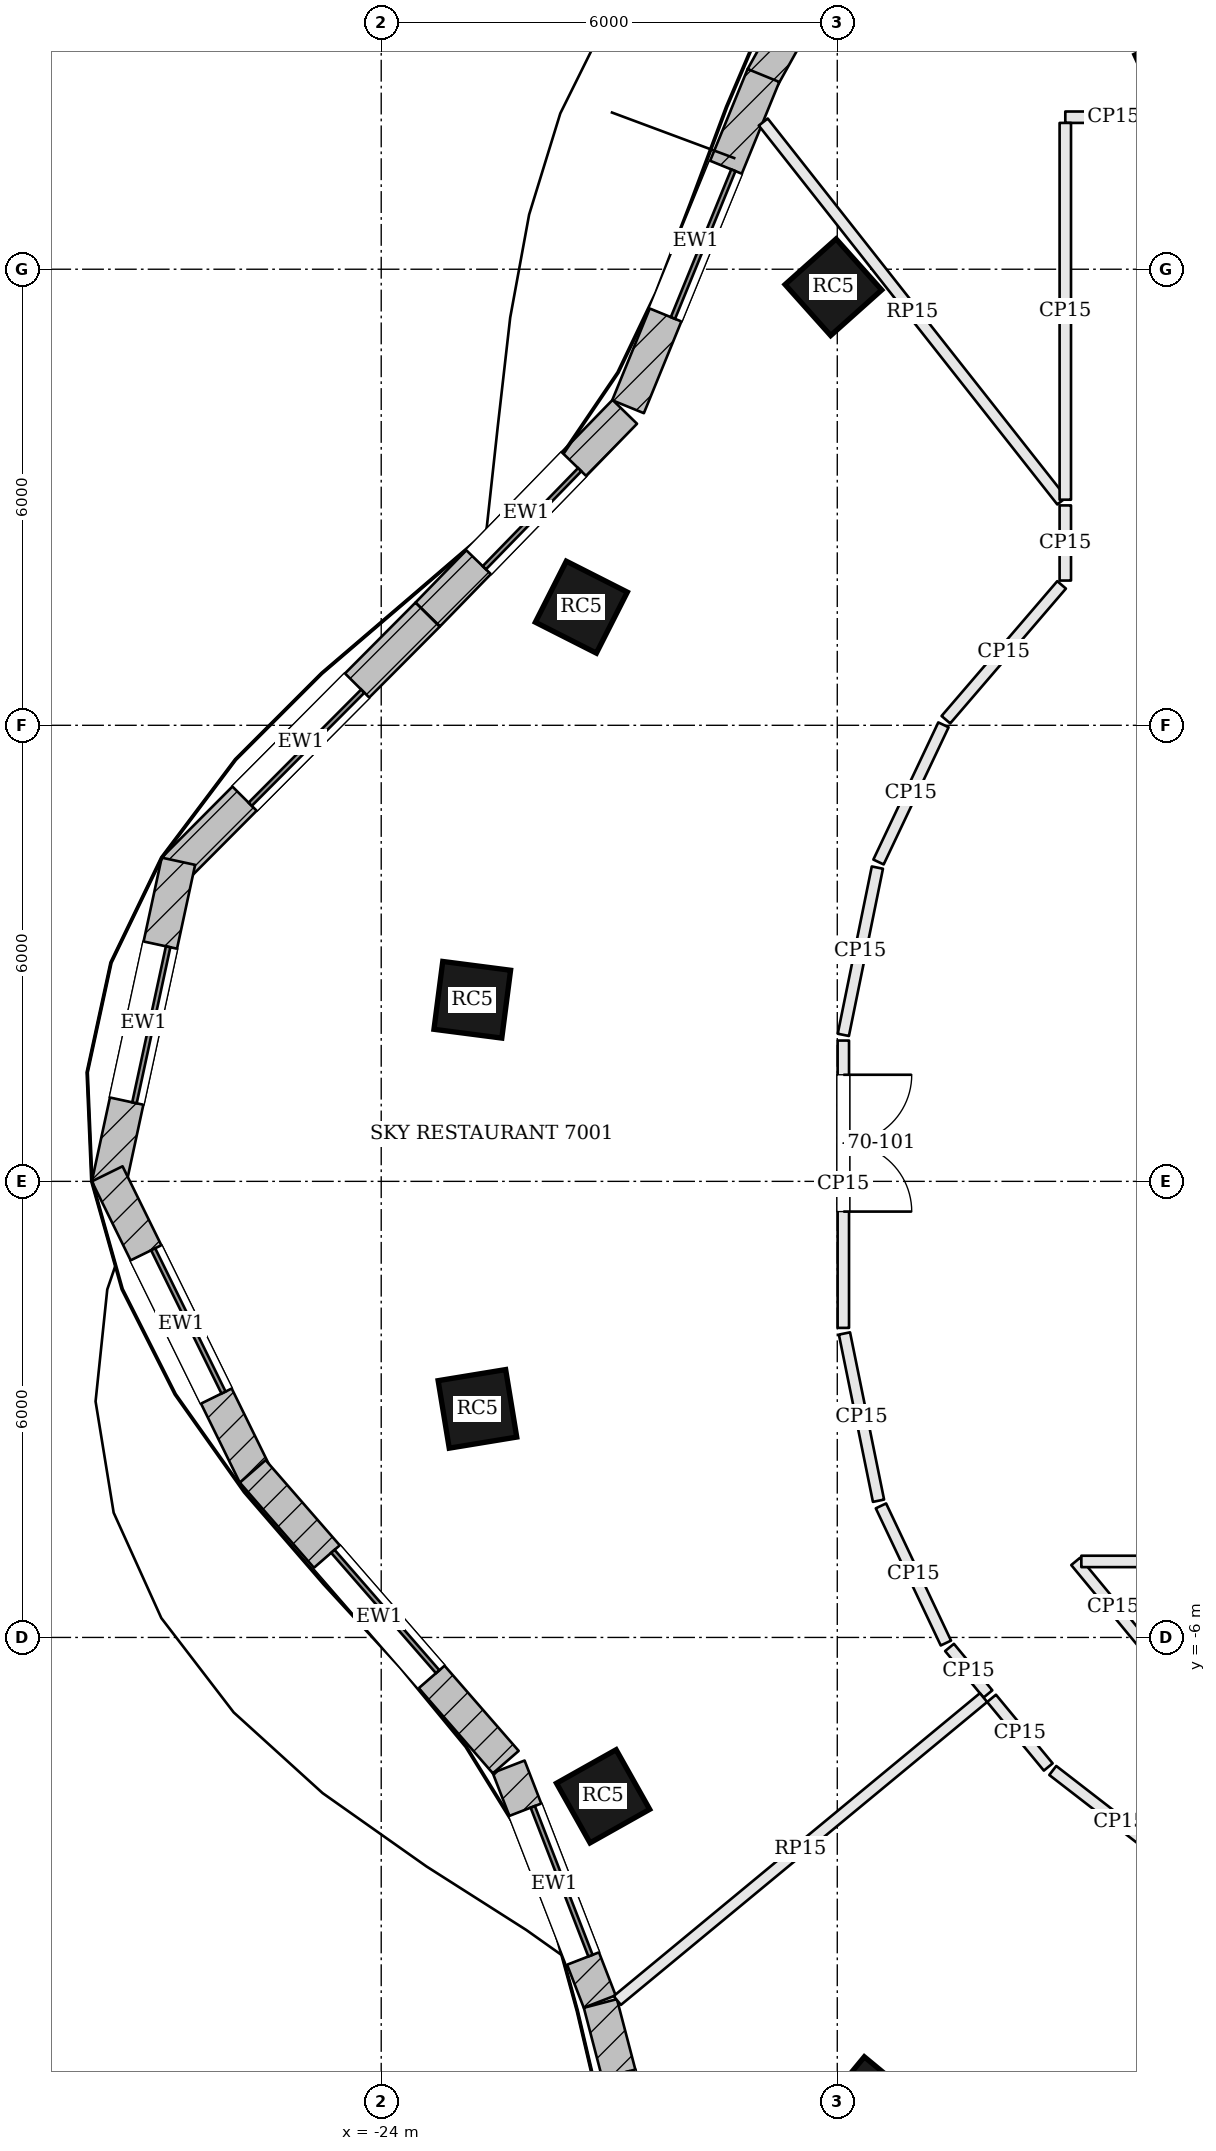
"""IFC4 building model, lengths in metres.
Left out: names, types, materials, properties, quantities, classifications, styles, units other than length and angle.
Written with IfcOpenShell. Run it as: python <this file> out.ifc"""

import sys

from ifc_helpers import new_model, si_unit, direction, frame, frame_2d, origin, origin_2d, place, context, subcontext, project, spatial, rectangle, extrude, element, fill, save


model = new_model("IFC4")
c1 = context("Model", 3, precision=1e-05, world=origin(), true_north=direction((0.0, 1.0)))
c2 = subcontext(c1, "Body", "Model", "MODEL_VIEW")
j1 = project(units=[si_unit("LENGTHUNIT", "METRE"), si_unit("PLANEANGLEUNIT", "RADIAN")], contexts=[c1])
p1 = place(None, origin())
s1 = spatial("IfcSite", under=j1, at=p1, CompositionType="ELEMENT")
p2 = place(p1, origin())
s2 = spatial("IfcBuilding", under=s1, at=p2, CompositionType="ELEMENT")
p3 = place(p2, frame((0.0, 0.0, 284.4)))
s3 = spatial("IfcBuildingStorey", under=s2, at=p3, CompositionType="ELEMENT", Elevation=284.4)
for number, where, z_axis, x_axis in (
    (1, (-13.487, 14.596, 0.0), (0.0, 0.0, 1.0), (-0.91, -0.415, 0.0)),
    (2, (-18.051, 11.763, 0.0), (0.0, 0.0, 1.0), (-0.746, -0.666, 0.0)),
    (3, (-21.367, 7.554, 0.0), (0.0, 0.0, 1.0), (-0.452, -0.892, 0.0)),
    (4, (-22.802, 2.389, 0.0), (0.0, 0.0, 1.0), (-0.129, -0.992, 0.0)),
    (5, (-22.734, -2.993, 0.0), (0.0, 0.0, 1.0), (0.162, -0.987, 0.0)),
    (6, (-21.081, -8.09, 0.0), (0.0, 0.0, 1.0), (0.49, -0.872, 0.0)),
    (7, (-17.584, -12.151, 0.0), (0.0, 0.0, 1.0), (0.771, -0.637, 0.0)),
):
    element("IfcColumn", number, at=place(p3, frame(where, z_axis=z_axis, x_axis=x_axis)), inside=s3, PredefinedType="COLUMN", context=c2, shape_type="SweptSolid", body=[
        extrude(rectangle(XDim=0.9, YDim=0.9, at=origin_2d()), origin(), (0.0, 0.0, 1.0), 3.9),
    ])
p4 = place(p3, frame((-17.359, 17.447, 0.0), z_axis=(0.0, 0.0, 1.0), x_axis=(-0.485618126214, -0.874171056197, 0.0)))
e8 = element("IfcWall", 8, at=p4, inside=s3, PredefinedType="SOLIDWALL", context=c2, shape_type="SweptSolid", body=[
    extrude(rectangle(XDim=3.343, YDim=0.45, at=frame_2d((1.671, 0.0))), origin(), (0.0, 0.0, 1.0), 3.7),
])
p5 = place(p4, frame((0.621, 0.0, 0.9)))
e9 = element("IfcOpeningElement", 9, at=p5, cuts=e8, PredefinedType="OPENING", context=c2, shape_type="SweptSolid", body=[
    extrude(rectangle(XDim=2.1, YDim=2.3, at=frame_2d((1.05, 1.15))), frame((0.0, 0.235, 0.0), z_axis=(0.0, -1.0, 0.0), x_axis=(1.0, 0.0, 0.0)), (0.0, 0.0, 1.0), 0.47),
])
p6 = place(p3, frame((-18.971, 14.549, 0.0), z_axis=(0.0, 0.0, 1.0), x_axis=(-0.378434936431, -0.925627894398, 0.0)))
e10 = element("IfcWall", 10, at=p6, inside=s3, PredefinedType="SOLIDWALL", context=c2, shape_type="SweptSolid", body=[
    extrude(rectangle(XDim=4.708, YDim=0.45, at=frame_2d((2.354, 0.0))), origin(), (0.0, 0.0, 1.0), 3.7),
])
p7 = place(p6, frame((1.304, 0.0, 0.9)))
e11 = element("IfcOpeningElement", 11, at=p7, cuts=e10, PredefinedType="OPENING", context=c2, shape_type="SweptSolid", body=[
    extrude(rectangle(XDim=2.1, YDim=2.3, at=frame_2d((1.05, 1.15))), frame((0.0, 0.235, 0.0), z_axis=(0.0, -1.0, 0.0), x_axis=(1.0, 0.0, 0.0)), (0.0, 0.0, 1.0), 0.47),
])
p8 = place(p3, frame((-20.796, 10.124, 0.0), z_axis=(0.0, 0.0, 1.0), x_axis=(-0.697121527554, -0.716952980203, 0.0)))
e12 = element("IfcWall", 12, at=p8, inside=s3, PredefinedType="SOLIDWALL", context=c2, shape_type="SweptSolid", body=[
    extrude(rectangle(XDim=3.718, YDim=0.45, at=frame_2d((1.859, 0.0))), origin(), (0.0, 0.0, 1.0), 3.7),
])
p9 = place(p8, frame((0.959, 0.0, 0.9)))
e13 = element("IfcOpeningElement", 13, at=p9, cuts=e12, PredefinedType="OPENING", context=c2, shape_type="SweptSolid", body=[
    extrude(rectangle(XDim=1.8, YDim=2.3, at=frame_2d((0.9, 1.15))), frame((0.0, 0.235, 0.0), z_axis=(0.0, -1.0, 0.0), x_axis=(1.0, 0.0, 0.0)), (0.0, 0.0, 1.0), 0.47),
])
p10 = place(p3, frame((-23.39, 7.456, 0.0), z_axis=(0.0, 0.0, 1.0), x_axis=(-0.705349231702, -0.708859973011, 0.0)))
e14 = element("IfcWall", 14, at=p10, inside=s3, PredefinedType="SOLIDWALL", context=c2, shape_type="SweptSolid", body=[
    extrude(rectangle(XDim=4.729, YDim=0.45, at=frame_2d((2.364, 0.0))), origin(), (0.0, 0.0, 1.0), 3.7),
])
p11 = place(p10, frame((1.314, 0.0, 0.9)))
e15 = element("IfcOpeningElement", 15, at=p11, cuts=e14, PredefinedType="OPENING", context=c2, shape_type="SweptSolid", body=[
    extrude(rectangle(XDim=2.1, YDim=2.3, at=frame_2d((1.05, 1.15))), frame((0.0, 0.235, 0.0), z_axis=(0.0, -1.0, 0.0), x_axis=(1.0, 0.0, 0.0)), (0.0, 0.0, 1.0), 0.47),
])
p12 = place(p3, frame((-26.668, 4.211, 0.0), z_axis=(0.0, 0.0, 1.0), x_axis=(-0.210910311825, -0.977505417052, 0.0)))
e16 = element("IfcWall", 16, at=p12, inside=s3, PredefinedType="SOLIDWALL", context=c2, shape_type="SweptSolid", body=[
    extrude(rectangle(XDim=4.357, YDim=0.45, at=frame_2d((2.178, 0.0))), origin(), (0.0, 0.0, 1.0), 3.7),
])
p13 = place(p12, frame((1.128, 0.0, 0.9)))
e17 = element("IfcOpeningElement", 17, at=p13, cuts=e16, PredefinedType="OPENING", context=c2, shape_type="SweptSolid", body=[
    extrude(rectangle(XDim=2.1, YDim=2.3, at=frame_2d((1.05, 1.15))), frame((0.0, 0.235, 0.0), z_axis=(0.0, -1.0, 0.0), x_axis=(1.0, 0.0, 0.0)), (0.0, 0.0, 1.0), 0.47),
])
p14 = place(p3, frame((-27.605, 0.099, 0.0), z_axis=(0.0, 0.0, 1.0), x_axis=(0.440876526139, -0.897567762734, 0.0)))
e18 = element("IfcWall", 18, at=p14, inside=s3, PredefinedType="SOLIDWALL", context=c2, shape_type="SweptSolid", body=[
    extrude(rectangle(XDim=4.415, YDim=0.45, at=frame_2d((2.208, 0.0))), origin(), (0.0, 0.0, 1.0), 3.7),
])
p15 = place(p14, frame((1.158, 0.0, 0.9)))
e19 = element("IfcOpeningElement", 19, at=p15, cuts=e18, PredefinedType="OPENING", context=c2, shape_type="SweptSolid", body=[
    extrude(rectangle(XDim=2.1, YDim=2.3, at=frame_2d((1.05, 1.15))), frame((0.0, 0.235, 0.0), z_axis=(0.0, -1.0, 0.0), x_axis=(1.0, 0.0, 0.0)), (0.0, 0.0, 1.0), 0.47),
])
p16 = place(p3, frame((-25.691, -3.815, 0.0), z_axis=(0.0, 0.0, 1.0), x_axis=(0.656552883353, -0.754279995334, 0.0)))
e20 = element("IfcWall", 20, at=p16, inside=s3, PredefinedType="SOLIDWALL", context=c2, shape_type="SweptSolid", body=[
    extrude(rectangle(XDim=5.071, YDim=0.45, at=frame_2d((2.536, 0.0))), origin(), (0.0, 0.0, 1.0), 3.7),
])
p17 = place(p16, frame((1.486, 0.0, 0.9)))
e21 = element("IfcOpeningElement", 21, at=p17, cuts=e20, PredefinedType="OPENING", context=c2, shape_type="SweptSolid", body=[
    extrude(rectangle(XDim=2.1, YDim=2.3, at=frame_2d((1.05, 1.15))), frame((0.0, 0.235, 0.0), z_axis=(0.0, -1.0, 0.0), x_axis=(1.0, 0.0, 0.0)), (0.0, 0.0, 1.0), 0.47),
])
p18 = place(p3, frame((-22.323, -7.701, 0.0), z_axis=(0.0, 0.0, 1.0), x_axis=(0.361550075906, -0.932352692178, 0.0)))
e22 = element("IfcWall", 22, at=p18, inside=s3, PredefinedType="SOLIDWALL", context=c2, shape_type="SweptSolid", body=[
    extrude(rectangle(XDim=3.313, YDim=0.45, at=frame_2d((1.657, 0.0))), origin(), (0.0, 0.0, 1.0), 3.7),
])
p19 = place(p18, frame((0.607, 0.0, 0.9)))
e23 = element("IfcOpeningElement", 23, at=p19, cuts=e22, PredefinedType="OPENING", context=c2, shape_type="SweptSolid", body=[
    extrude(rectangle(XDim=2.1, YDim=2.3, at=frame_2d((1.05, 1.15))), frame((0.0, 0.235, 0.0), z_axis=(0.0, -1.0, 0.0), x_axis=(1.0, 0.0, 0.0)), (0.0, 0.0, 1.0), 0.47),
])
p20 = place(p3, frame((-21.117, -10.815, 0.0), z_axis=(0.0, 0.0, 1.0), x_axis=(0.253065392985, -0.967449175344, 0.0)))
e24 = element("IfcWall", 24, at=p20, inside=s3, PredefinedType="SOLIDWALL", context=c2, shape_type="SweptSolid", body=[
    extrude(rectangle(XDim=4.015, YDim=0.45, at=frame_2d((2.008, 0.0))), origin(), (0.0, 0.0, 1.0), 3.7),
])
p21 = place(p20, frame((0.958, 0.0, 0.9)))
e25 = element("IfcOpeningElement", 25, at=p21, cuts=e24, PredefinedType="OPENING", context=c2, shape_type="SweptSolid", body=[
    extrude(rectangle(XDim=2.1, YDim=2.3, at=frame_2d((1.05, 1.15))), frame((0.0, 0.235, 0.0), z_axis=(0.0, -1.0, 0.0), x_axis=(1.0, 0.0, 0.0)), (0.0, 0.0, 1.0), 0.47),
])
p22 = place(p3, frame((-15.0, 8.893, 0.0), z_axis=(0.0, 0.0, 1.0), x_axis=(0.0, -1.0, 0.0)))
e26 = element("IfcWall", 26, at=p22, inside=s3, PredefinedType="PARTITIONING", context=c2, shape_type="SweptSolid", body=[
    extrude(rectangle(XDim=0.989, YDim=0.15, at=frame_2d((0.494, 0.0))), origin(), (0.0, 0.0, 1.0), 3.198),
])
p23 = place(p3, frame((-15.049, 7.847, 0.0), z_axis=(0.0, 0.0, 1.0), x_axis=(-0.651264357687, -0.758850931611, 0.0)))
e27 = element("IfcWall", 27, at=p23, inside=s3, PredefinedType="PARTITIONING", context=c2, shape_type="SweptSolid", body=[
    extrude(rectangle(XDim=2.337, YDim=0.15, at=frame_2d((1.169, 0.0))), origin(), (0.0, 0.0, 1.0), 3.198),
])
p24 = place(p3, frame((-16.603, 6.006, 0.0), z_axis=(0.0, 0.0, 1.0), x_axis=(-0.427839289523, -0.903854823708, 0.0)))
e28 = element("IfcWall", 28, at=p24, inside=s3, PredefinedType="PARTITIONING", context=c2, shape_type="SweptSolid", body=[
    extrude(rectangle(XDim=1.997, YDim=0.15, at=frame_2d((0.998, 0.0))), origin(), (0.0, 0.0, 1.0), 3.198),
])
p25 = place(p3, frame((-17.472, 4.128, 0.0), z_axis=(0.0, 0.0, 1.0), x_axis=(-0.199502025364, -0.979897413955, 0.0)))
e29 = element("IfcWall", 29, at=p25, inside=s3, PredefinedType="PARTITIONING", context=c2, shape_type="SweptSolid", body=[
    extrude(rectangle(XDim=2.246, YDim=0.15, at=frame_2d((1.123, 0.0))), origin(), (0.0, 0.0, 1.0), 3.198),
])
p26 = place(p3, frame((-17.92, 1.853, 0.0), z_axis=(0.0, 0.0, 1.0), x_axis=(0.0, -1.0, 0.0)))
e30 = element("IfcWall", 30, at=p26, inside=s3, PredefinedType="PARTITIONING", context=c2, shape_type="SweptSolid", body=[
    extrude(rectangle(XDim=3.78, YDim=0.15, at=frame_2d((1.89, 0.0))), origin(), (0.0, 0.0, 1.0), 3.198),
])
p27 = place(p26, frame((0.45, 0.0, 0.0)))
e31 = element("IfcOpeningElement", 31, at=p27, cuts=e30, PredefinedType="OPENING", context=c2, shape_type="SweptSolid", body=[
    extrude(rectangle(XDim=1.8, YDim=2.1, at=frame_2d((0.9, 1.05))), frame((0.0, 0.085, 0.0), z_axis=(0.0, -1.0, 0.0), x_axis=(1.0, 0.0, 0.0)), (0.0, 0.0, 1.0), 0.17),
])
p28 = place(p3, frame((-17.906, -2.001, 0.0), z_axis=(0.0, 0.0, 1.0), x_axis=(0.199502025364, -0.979897413955, 0.0)))
e32 = element("IfcWall", 32, at=p28, inside=s3, PredefinedType="PARTITIONING", context=c2, shape_type="SweptSolid", body=[
    extrude(rectangle(XDim=2.246, YDim=0.15, at=frame_2d((1.123, 0.0))), origin(), (0.0, 0.0, 1.0), 3.198),
])
p29 = place(p3, frame((-17.425, -4.269, 0.0), z_axis=(0.0, 0.0, 1.0), x_axis=(0.427886578366, -0.90383243804, 0.0)))
e33 = element("IfcWall", 33, at=p29, inside=s3, PredefinedType="PARTITIONING", context=c2, shape_type="SweptSolid", body=[
    extrude(rectangle(XDim=1.996, YDim=0.15, at=frame_2d((0.998, 0.0))), origin(), (0.0, 0.0, 1.0), 3.198),
])
p30 = place(p3, frame((-16.523, -6.132, 0.0), z_axis=(0.0, 0.0, 1.0), x_axis=(0.636698606768, -0.771112757085, 0.0)))
e34 = element("IfcWall", 34, at=p30, inside=s3, PredefinedType="PARTITIONING", context=c2, shape_type="SweptSolid", body=[
    extrude(rectangle(XDim=0.794, YDim=0.15, at=frame_2d((0.397, 0.0))), origin(), (0.0, 0.0, 1.0), 3.198),
])
p31 = place(p3, frame((-18.974, 13.937, 0.0), z_axis=(0.0, 0.0, 1.0), x_axis=(0.618916821117, -0.785456535104, 0.0)))
e35 = element("IfcWall", 35, at=p31, inside=s3, PredefinedType="PARTITIONING", context=c2, shape_type="SweptSolid", body=[
    extrude(rectangle(XDim=6.346, YDim=0.15, at=frame_2d((3.173, 0.0))), origin(), (0.0, 0.0, 1.0), 3.234),
])
p32 = place(p3, frame((-20.894, -10.777, 0.0), z_axis=(0.0, 0.0, 1.0), x_axis=(0.770606553, 0.637311180251, 0.0)))
e36 = element("IfcWall", 36, at=p32, inside=s3, PredefinedType="PARTITIONING", context=c2, shape_type="SweptSolid", body=[
    extrude(rectangle(XDim=6.253, YDim=0.15, at=frame_2d((3.126, 0.0))), origin(), (0.0, 0.0, 1.0), 3.234),
])
p33 = place(p3, frame((-15.97, -6.802, 0.0), z_axis=(0.0, 0.0, 1.0), x_axis=(0.636897609689, -0.770948399552, 0.0)))
e37 = element("IfcWall", 37, at=p33, inside=s3, PredefinedType="PARTITIONING", context=c2, shape_type="SweptSolid", body=[
    extrude(rectangle(XDim=1.171, YDim=0.15, at=frame_2d((0.585, 0.0))), origin(), (0.0, 0.0, 1.0), 3.198),
])
p34 = place(p3, frame((-15.165, -7.75, 0.0), z_axis=(0.0, 0.0, 1.0), x_axis=(0.790917548929, -0.611922732701, 0.0)))
e38 = element("IfcWall", 38, at=p34, inside=s3, PredefinedType="PARTITIONING", context=c2, shape_type="SweptSolid", body=[
    extrude(rectangle(XDim=2.222, YDim=0.15, at=frame_2d((1.111, 0.0))), origin(), (0.0, 0.0, 1.0), 3.198),
])
p35 = place(p3, frame((-13.732, 14.0, 0.0), z_axis=(0.0, 0.0, 1.0), x_axis=(-1.0, 0.0, 0.0)))
e39 = element("IfcWall", 39, at=p35, inside=s3, PredefinedType="PARTITIONING", context=c2, shape_type="SweptSolid", body=[
    extrude(rectangle(XDim=1.268, YDim=0.15, at=frame_2d((0.634, 0.0))), origin(), (0.0, 0.0, 1.0), 3.198),
])
p36 = place(p3, frame((-15.0, 13.925, 0.0), z_axis=(0.0, 0.0, 1.0), x_axis=(0.0, -1.0, 0.0)))
e40 = element("IfcWall", 40, at=p36, inside=s3, PredefinedType="PARTITIONING", context=c2, shape_type="SweptSolid", body=[
    extrude(rectangle(XDim=4.957, YDim=0.15, at=frame_2d((2.479, 0.0))), origin(), (0.0, 0.0, 1.0), 3.198),
])
p37 = place(p3, frame((-13.872, -6.201, 0.0), z_axis=(0.0, 0.0, 1.0), x_axis=(-0.636832838855, 0.771001903601, 0.0)))
e41 = element("IfcWall", 41, at=p37, inside=s3, PredefinedType="PARTITIONING", context=c2, shape_type="SweptSolid", body=[
    extrude(rectangle(XDim=1.558, YDim=0.15, at=frame_2d((0.779, 0.0))), origin(), (0.0, 0.0, 1.0), 3.198),
])
p38 = place(p3, frame((-14.789, -5.0, 0.0), z_axis=(0.0, 0.0, 1.0), x_axis=(1.0, 0.0, 0.0)))
e42 = element("IfcWall", 42, at=p38, inside=s3, PredefinedType="PARTITIONING", context=c2, shape_type="SweptSolid", body=[
    extrude(rectangle(XDim=29.562, YDim=0.15, at=frame_2d((14.781, 0.0))), origin(), (0.0, 0.0, 1.0), 3.198),
])
p39 = place(p38, frame((3.857, 0.0, 0.0)))
e43 = element("IfcOpeningElement", 43, at=p39, cuts=e42, PredefinedType="OPENING", context=c2, shape_type="SweptSolid", body=[
    extrude(rectangle(XDim=1.0, YDim=2.4, at=frame_2d((0.5, 1.2))), frame((0.0, 0.085, 0.0), z_axis=(0.0, -1.0, 0.0), x_axis=(1.0, 0.0, 0.0)), (0.0, 0.0, 1.0), 0.17),
])
p40 = place(p38, frame((14.289, 0.0, 0.0)))
e44 = element("IfcOpeningElement", 44, at=p40, cuts=e42, PredefinedType="OPENING", context=c2, shape_type="SweptSolid", body=[
    extrude(rectangle(XDim=1.0, YDim=2.1, at=frame_2d((0.5, 1.05))), frame((0.0, 0.085, 0.0), z_axis=(0.0, -1.0, 0.0), x_axis=(1.0, 0.0, 0.0)), (0.0, 0.0, 1.0), 0.17),
])
p41 = place(p38, frame((24.713, 0.0, 0.0)))
e45 = element("IfcOpeningElement", 45, at=p41, cuts=e42, PredefinedType="OPENING", context=c2, shape_type="SweptSolid", body=[
    extrude(rectangle(XDim=1.0, YDim=2.4, at=frame_2d((0.5, 1.2))), frame((0.0, 0.085, 0.0), z_axis=(0.0, -1.0, 0.0), x_axis=(1.0, 0.0, 0.0)), (0.0, 0.0, 1.0), 0.17),
])
p42 = place(p7, origin())
e46 = element("IfcWindow", 46, at=p42, inside=s3, PartitioningType="SINGLE_PANEL", PredefinedType="WINDOW", context=c2, shape_type="SweptSolid", body=[
    extrude(rectangle(XDim=2.1, YDim=2.3, at=frame_2d((1.05, 1.15))), frame((0.0, 0.135, 0.0), z_axis=(0.0, -1.0, 0.0), x_axis=(1.0, 0.0, 0.0)), (0.0, 0.0, 1.0), 0.06),
])
fill(e11, e46)
p43 = place(p9, origin())
e47 = element("IfcWindow", 47, at=p43, inside=s3, PartitioningType="SINGLE_PANEL", PredefinedType="WINDOW", context=c2, shape_type="SweptSolid", body=[
    extrude(rectangle(XDim=1.8, YDim=2.3, at=frame_2d((0.9, 1.15))), frame((0.0, 0.135, 0.0), z_axis=(0.0, -1.0, 0.0), x_axis=(1.0, 0.0, 0.0)), (0.0, 0.0, 1.0), 0.06),
])
fill(e13, e47)
p44 = place(p11, origin())
e48 = element("IfcWindow", 48, at=p44, inside=s3, PartitioningType="SINGLE_PANEL", PredefinedType="WINDOW", context=c2, shape_type="SweptSolid", body=[
    extrude(rectangle(XDim=2.1, YDim=2.3, at=frame_2d((1.05, 1.15))), frame((0.0, 0.135, 0.0), z_axis=(0.0, -1.0, 0.0), x_axis=(1.0, 0.0, 0.0)), (0.0, 0.0, 1.0), 0.06),
])
fill(e15, e48)
p45 = place(p13, origin())
e49 = element("IfcWindow", 49, at=p45, inside=s3, PartitioningType="SINGLE_PANEL", PredefinedType="WINDOW", context=c2, shape_type="SweptSolid", body=[
    extrude(rectangle(XDim=2.1, YDim=2.3, at=frame_2d((1.05, 1.15))), frame((0.0, 0.135, 0.0), z_axis=(0.0, -1.0, 0.0), x_axis=(1.0, 0.0, 0.0)), (0.0, 0.0, 1.0), 0.06),
])
fill(e17, e49)
p46 = place(p15, origin())
e50 = element("IfcWindow", 50, at=p46, inside=s3, PartitioningType="SINGLE_PANEL", PredefinedType="WINDOW", context=c2, shape_type="SweptSolid", body=[
    extrude(rectangle(XDim=2.1, YDim=2.3, at=frame_2d((1.05, 1.15))), frame((0.0, 0.135, 0.0), z_axis=(0.0, -1.0, 0.0), x_axis=(1.0, 0.0, 0.0)), (0.0, 0.0, 1.0), 0.06),
])
fill(e19, e50)
p47 = place(p17, origin())
e51 = element("IfcWindow", 51, at=p47, inside=s3, PartitioningType="SINGLE_PANEL", PredefinedType="WINDOW", context=c2, shape_type="SweptSolid", body=[
    extrude(rectangle(XDim=2.1, YDim=2.3, at=frame_2d((1.05, 1.15))), frame((0.0, 0.135, 0.0), z_axis=(0.0, -1.0, 0.0), x_axis=(1.0, 0.0, 0.0)), (0.0, 0.0, 1.0), 0.06),
])
fill(e21, e51)
p48 = place(p19, origin())
e52 = element("IfcWindow", 52, at=p48, inside=s3, PartitioningType="SINGLE_PANEL", PredefinedType="WINDOW", context=c2, shape_type="SweptSolid", body=[
    extrude(rectangle(XDim=2.1, YDim=2.3, at=frame_2d((1.05, 1.15))), frame((0.0, 0.135, 0.0), z_axis=(0.0, -1.0, 0.0), x_axis=(1.0, 0.0, 0.0)), (0.0, 0.0, 1.0), 0.06),
])
fill(e23, e52)
p49 = place(p27, origin())
e53 = element("IfcDoor", 53, at=p49, inside=s3, OperationType="DOUBLE_DOOR_SINGLE_SWING", PredefinedType="DOOR", context=c2, shape_type="SweptSolid", body=[
    extrude(rectangle(XDim=1.8, YDim=2.1, at=frame_2d((0.9, 1.05))), frame((0.0, 0.025, 0.0), z_axis=(0.0, -1.0, 0.0), x_axis=(1.0, 0.0, 0.0)), (0.0, 0.0, 1.0), 0.05),
])
fill(e31, e53)
save(model, sys.argv[1])
